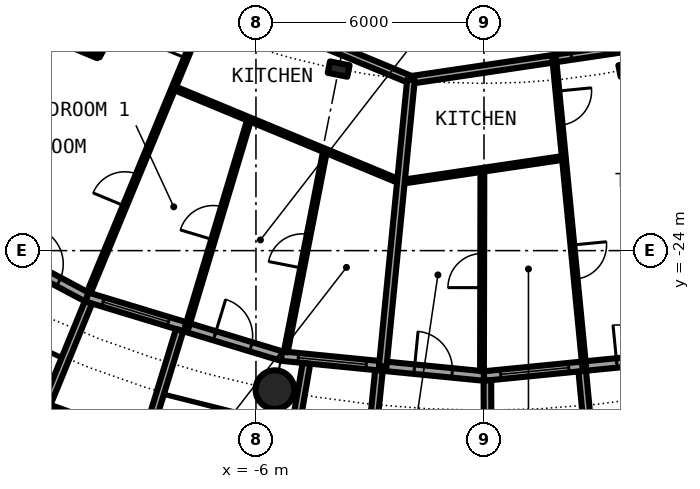
"""IFC4 building model, lengths in metres.
Left out: names, types, materials, properties, quantities, classifications, styles, units other than length and angle.
Written with IfcOpenShell. Run it as: python <this file> out.ifc"""

import sys

from ifc_helpers import new_model, si_unit, direction, frame, frame_2d, origin, origin_2d, place, context, subcontext, project, spatial, rectangle, circle, hollow_circle, i_section, extrude, element, fill, save


model = new_model("IFC4")
c1 = context("Model", 3, precision=1e-05, world=origin(), true_north=direction((0.0, 1.0)))
c2 = subcontext(c1, "Body", "Model", "MODEL_VIEW")
j1 = project(units=[si_unit("LENGTHUNIT", "METRE"), si_unit("PLANEANGLEUNIT", "RADIAN")], contexts=[c1])
p1 = place(None, origin())
s1 = spatial("IfcSite", under=j1, at=p1, CompositionType="ELEMENT")
p2 = place(p1, origin())
s2 = spatial("IfcBuilding", under=s1, at=p2, CompositionType="ELEMENT")
p3 = place(p2, frame((0.0, 0.0, 75.8)))
s3 = spatial("IfcBuildingStorey", under=s2, at=p3, CompositionType="ELEMENT", Elevation=75.8)
p4 = place(p3, frame((-5.501, -27.658, 0.0), z_axis=(0.0, 0.0, 1.0), x_axis=(1.0, 0.0, 0.0)))
e1 = element("IfcColumn", 1, at=p4, inside=s3, PredefinedType="COLUMN", context=c2, shape_type="SweptSolid", body=[
    extrude(hollow_circle(Radius=0.508, WallThickness=0.04, at=origin_2d()), origin(), (0.0, 0.0, 1.0), 3.05),
])
for number, where, z_axis, x_axis in (
    (2, (-3.824, -19.223, 0.0), (0.0, 0.0, 1.0), (-0.195, -0.981, 0.0)),
    (3, (3.824, -19.223, 0.0), (0.0, 0.0, 1.0), (0.195, -0.981, 0.0)),
):
    element("IfcColumn", number, at=place(p3, frame(where, z_axis=z_axis, x_axis=x_axis)), inside=s3, PredefinedType="COLUMN", context=c2, shape_type="SweptSolid", body=[
        extrude(i_section(OverallWidth=0.306, OverallDepth=0.524, WebThickness=0.021, FlangeThickness=0.04, FilletRadius=0.027, at=origin_2d()), origin(), (0.0, 0.0, 1.0), 3.05),
    ])
p5 = place(p3, frame((-15.167, -22.699, 0.0), z_axis=(0.0, 0.0, 1.0), x_axis=(0.881915646801, -0.471407246368, 0.0)))
e4 = element("IfcWall", 4, at=p5, inside=s3, PredefinedType="SOLIDWALL", context=c2, shape_type="SweptSolid", body=[
    extrude(rectangle(XDim=5.352, YDim=0.25, at=frame_2d((2.676, 0.0))), origin(), (0.0, 0.0, 1.0), 2.7),
])
p6 = place(p5, frame((0.441, 0.0, 0.3)))
e5 = element("IfcOpeningElement", 5, at=p6, cuts=e4, PredefinedType="OPENING", context=c2, shape_type="SweptSolid", body=[
    extrude(rectangle(XDim=1.8, YDim=2.1, at=frame_2d((0.9, 1.05))), frame((0.0, 0.135, 0.0), z_axis=(0.0, -1.0, 0.0), x_axis=(1.0, 0.0, 0.0)), (0.0, 0.0, 1.0), 0.27),
])
p7 = place(p5, frame((3.51, 0.0, 0.0)))
e6 = element("IfcOpeningElement", 6, at=p7, cuts=e4, PredefinedType="OPENING", context=c2, shape_type="SweptSolid", body=[
    extrude(rectangle(XDim=1.0, YDim=2.2, at=frame_2d((0.5, 1.1))), frame((0.0, 0.135, 0.0), z_axis=(0.0, -1.0, 0.0), x_axis=(1.0, 0.0, 0.0)), (0.0, 0.0, 1.0), 0.27),
])
p8 = place(p3, frame((-10.447, -25.222, 0.0), z_axis=(0.0, 0.0, 1.0), x_axis=(0.956965678721, -0.290201119486, 0.0)))
e7 = element("IfcWall", 7, at=p8, inside=s3, PredefinedType="SOLIDWALL", context=c2, shape_type="SweptSolid", body=[
    extrude(rectangle(XDim=5.351, YDim=0.25, at=frame_2d((2.676, 0.0))), origin(), (0.0, 0.0, 1.0), 2.7),
])
p9 = place(p8, frame((0.441, 0.0, 0.3)))
e8 = element("IfcOpeningElement", 8, at=p9, cuts=e7, PredefinedType="OPENING", context=c2, shape_type="SweptSolid", body=[
    extrude(rectangle(XDim=1.8, YDim=2.1, at=frame_2d((0.9, 1.05))), frame((0.0, 0.135, 0.0), z_axis=(0.0, -1.0, 0.0), x_axis=(1.0, 0.0, 0.0)), (0.0, 0.0, 1.0), 0.27),
])
p10 = place(p8, frame((3.51, 0.0, 0.0)))
e9 = element("IfcOpeningElement", 9, at=p10, cuts=e7, PredefinedType="OPENING", context=c2, shape_type="SweptSolid", body=[
    extrude(rectangle(XDim=1.0, YDim=2.2, at=frame_2d((0.5, 1.1))), frame((0.0, 0.135, 0.0), z_axis=(0.0, -1.0, 0.0), x_axis=(1.0, 0.0, 0.0)), (0.0, 0.0, 1.0), 0.27),
])
p11 = place(p3, frame((-11.638, -28.084, -0.03), z_axis=(0.0, 0.0, 1.0), x_axis=(0.941461077774, -0.337121697664, 0.0)))
e10 = element("IfcWall", 10, at=p11, inside=s3, PredefinedType="SOLIDWALL", context=c2, shape_type="SweptSolid", body=[
    extrude(rectangle(XDim=2.993, YDim=0.2, at=frame_2d((1.497, 0.0))), origin(), (0.0, 0.0, 1.0), 2.73),
])
p12 = place(p11, frame((0.457, 0.0, 0.33)))
e11 = element("IfcOpeningElement", 11, at=p12, cuts=e10, PredefinedType="OPENING", context=c2, shape_type="SweptSolid", body=[
    extrude(circle(Radius=1.04, at=frame_2d((1.04, 1.04))), frame((0.0, 0.11, 0.0), z_axis=(0.0, -1.0, 0.0), x_axis=(1.0, 0.0, 0.0)), (0.0, 0.0, 1.0), 0.22),
])
p13 = place(p3, frame((-10.409, -25.364, -0.03), z_axis=(0.0, 0.0, 1.0), x_axis=(-0.379509886562, -0.925187681501, 0.0)))
e12 = element("IfcWall", 12, at=p13, inside=s3, PredefinedType="SOLIDWALL", context=c2, shape_type="SweptSolid", body=[
    extrude(rectangle(XDim=2.883, YDim=0.2, at=frame_2d((1.441, 0.0))), origin(), (0.0, 0.0, 1.0), 2.73),
])
p14 = place(p3, frame((-8.009, -26.092, -0.03), z_axis=(0.0, 0.0, 1.0), x_axis=(-0.293406695073, -0.955987715029, 0.0)))
e13 = element("IfcWall", 13, at=p14, inside=s3, PredefinedType="SOLIDWALL", context=c2, shape_type="SweptSolid", body=[
    extrude(rectangle(XDim=3.006, YDim=0.2, at=frame_2d((1.503, 0.0))), origin(), (0.0, 0.0, 1.0), 2.73),
])
p15 = place(p3, frame((-5.326, -26.775, 0.0), z_axis=(0.0, 0.0, 1.0), x_axis=(0.995173996315, -0.098126026407, 0.0)))
e14 = element("IfcWall", 14, at=p15, inside=s3, PredefinedType="SOLIDWALL", context=c2, shape_type="SweptSolid", body=[
    extrude(rectangle(XDim=5.352, YDim=0.25, at=frame_2d((2.676, 0.0))), origin(), (0.0, 0.0, 1.0), 2.7),
])
p16 = place(p15, frame((0.441, 0.0, 0.3)))
e15 = element("IfcOpeningElement", 15, at=p16, cuts=e14, PredefinedType="OPENING", context=c2, shape_type="SweptSolid", body=[
    extrude(rectangle(XDim=1.8, YDim=2.1, at=frame_2d((0.9, 1.05))), frame((0.0, 0.135, 0.0), z_axis=(0.0, -1.0, 0.0), x_axis=(1.0, 0.0, 0.0)), (0.0, 0.0, 1.0), 0.27),
])
p17 = place(p15, frame((3.51, 0.0, 0.0)))
e16 = element("IfcOpeningElement", 16, at=p17, cuts=e14, PredefinedType="OPENING", context=c2, shape_type="SweptSolid", body=[
    extrude(rectangle(XDim=1.0, YDim=2.2, at=frame_2d((0.5, 1.1))), frame((0.0, 0.135, 0.0), z_axis=(0.0, -1.0, 0.0), x_axis=(1.0, 0.0, 0.0)), (0.0, 0.0, 1.0), 0.27),
])
p18 = place(p3, frame((-4.671, -26.966, -0.03), z_axis=(0.0, 0.0, 1.0), x_axis=(-0.170539878907, -0.985350774954, 0.0)))
e17 = element("IfcWall", 17, at=p18, inside=s3, PredefinedType="SOLIDWALL", context=c2, shape_type="SweptSolid", body=[
    extrude(rectangle(XDim=2.932, YDim=0.2, at=frame_2d((1.466, 0.0))), origin(), (0.0, 0.0, 1.0), 2.73),
])
p19 = place(p3, frame((-2.764, -27.153, -0.03), z_axis=(0.0, 0.0, 1.0), x_axis=(-0.101505487237, -0.994834979311, 0.0)))
e18 = element("IfcWall", 18, at=p19, inside=s3, PredefinedType="SOLIDWALL", context=c2, shape_type="SweptSolid", body=[
    extrude(rectangle(XDim=3.007, YDim=0.2, at=frame_2d((1.503, 0.0))), origin(), (0.0, 0.0, 1.0), 2.73),
])
p20 = place(p3, frame((0.0, -27.3, 0.0), z_axis=(0.0, 0.0, 1.0), x_axis=(0.995173996315, 0.098126026407, 0.0)))
e19 = element("IfcWall", 19, at=p20, inside=s3, PredefinedType="SOLIDWALL", context=c2, shape_type="SweptSolid", body=[
    extrude(rectangle(XDim=5.352, YDim=0.25, at=frame_2d((2.676, 0.0))), origin(), (0.0, 0.0, 1.0), 2.7),
])
p21 = place(p20, frame((0.441, 0.0, 0.3)))
e20 = element("IfcOpeningElement", 20, at=p21, cuts=e19, PredefinedType="OPENING", context=c2, shape_type="SweptSolid", body=[
    extrude(rectangle(XDim=1.8, YDim=2.1, at=frame_2d((0.9, 1.05))), frame((0.0, 0.135, 0.0), z_axis=(0.0, -1.0, 0.0), x_axis=(1.0, 0.0, 0.0)), (0.0, 0.0, 1.0), 0.27),
])
p22 = place(p20, frame((3.51, 0.0, 0.0)))
e21 = element("IfcOpeningElement", 21, at=p22, cuts=e19, PredefinedType="OPENING", context=c2, shape_type="SweptSolid", body=[
    extrude(rectangle(XDim=1.0, YDim=2.2, at=frame_2d((0.5, 1.1))), frame((0.0, 0.135, 0.0), z_axis=(0.0, -1.0, 0.0), x_axis=(1.0, 0.0, 0.0)), (0.0, 0.0, 1.0), 0.27),
])
p23 = place(p3, frame((0.09, -27.417, -0.03), z_axis=(0.0, 0.0, 1.0), x_axis=(0.00347308367, -0.999993968827, 0.0)))
e22 = element("IfcWall", 22, at=p23, inside=s3, PredefinedType="SOLIDWALL", context=c2, shape_type="SweptSolid", body=[
    extrude(rectangle(XDim=2.882, YDim=0.2, at=frame_2d((1.441, 0.0))), origin(), (0.0, 0.0, 1.0), 2.73),
])
p24 = place(p3, frame((2.586, -27.171, -0.03), z_axis=(0.0, 0.0, 1.0), x_axis=(0.094548432284, -0.995520262954, 0.0)))
e23 = element("IfcWall", 23, at=p24, inside=s3, PredefinedType="SOLIDWALL", context=c2, shape_type="SweptSolid", body=[
    extrude(rectangle(XDim=3.006, YDim=0.2, at=frame_2d((1.503, 0.0))), origin(), (0.0, 0.0, 1.0), 2.73),
])
p25 = place(p3, frame((-2.186, -22.193, 0.0), z_axis=(0.0, 0.0, 1.0), x_axis=(0.989171386505, 0.146765009863, 0.0)))
e24 = element("IfcWall", 24, at=p25, inside=s3, PredefinedType="PARTITIONING", context=c2, shape_type="SweptSolid", body=[
    extrude(rectangle(XDim=4.335, YDim=0.1, at=frame_2d((2.167, 0.0))), origin(), (0.0, 0.0, 1.0), 2.7),
])
p26 = place(p3, frame((-14.15, -17.236, 0.0), z_axis=(0.0, 0.0, 1.0), x_axis=(0.923789421174, -0.382900907975, 0.0)))
e25 = element("IfcWall", 25, at=p26, inside=s3, PredefinedType="PARTITIONING", context=c2, shape_type="SweptSolid", body=[
    extrude(rectangle(XDim=4.319, YDim=0.1, at=frame_2d((2.16, 0.0))), origin(), (0.0, 0.0, 1.0), 2.7),
])
p27 = place(p26, frame((0.634, 0.0, 0.0)))
e26 = element("IfcOpeningElement", 26, at=p27, cuts=e25, PredefinedType="OPENING", context=c2, shape_type="SweptSolid", body=[
    extrude(rectangle(XDim=0.9, YDim=2.3, at=frame_2d((0.45, 1.15))), frame((0.0, 0.06, 0.0), z_axis=(0.0, -1.0, 0.0), x_axis=(1.0, 0.0, 0.0)), (0.0, 0.0, 1.0), 0.12),
])
p28 = place(p3, frame((-8.168, -19.716, 0.0), z_axis=(0.0, 0.0, 1.0), x_axis=(0.923791567638, -0.382895729358, 0.0)))
e27 = element("IfcWall", 27, at=p28, inside=s3, PredefinedType="PARTITIONING", context=c2, shape_type="SweptSolid", body=[
    extrude(rectangle(XDim=6.474, YDim=0.1, at=frame_2d((3.237, 0.0))), origin(), (0.0, 0.0, 1.0), 2.7),
])
p29 = place(p3, frame((-1.918, -19.507, 0.0), z_axis=(0.0, 0.0, 1.0), x_axis=(0.989144916871, 0.146943300045, 0.0)))
e28 = element("IfcWall", 28, at=p29, inside=s3, PredefinedType="PARTITIONING", context=c2, shape_type="SweptSolid", body=[
    extrude(rectangle(XDim=9.529, YDim=0.2, at=frame_2d((4.764, 0.0))), origin(), (0.0, 0.0, 1.0), 2.38),
])
p30 = place(p29, frame((4.261, 0.0, 0.0)))
e29 = element("IfcOpeningElement", 29, at=p30, cuts=e28, PredefinedType="OPENING", context=c2, shape_type="SweptSolid", body=[
    extrude(rectangle(XDim=1.0, YDim=2.3, at=frame_2d((0.5, 1.15))), frame((0.0, 0.11, 0.0), z_axis=(0.0, -1.0, 0.0), x_axis=(1.0, 0.0, 0.0)), (0.0, 0.0, 1.0), 0.22),
])
p31 = place(p3, frame((-12.436, -15.15, 0.0), z_axis=(0.0, 0.0, 1.0), x_axis=(0.923858130651, -0.38273509694, 0.0)))
e30 = element("IfcWall", 30, at=p31, inside=s3, PredefinedType="PARTITIONING", context=c2, shape_type="SweptSolid", body=[
    extrude(rectangle(XDim=11.382, YDim=0.2, at=frame_2d((5.691, 0.0))), origin(), (0.0, 0.0, 1.0), 2.7),
])
p32 = place(p31, frame((4.239, 0.0, 0.0)))
e31 = element("IfcOpeningElement", 31, at=p32, cuts=e30, PredefinedType="OPENING", context=c2, shape_type="SweptSolid", body=[
    extrude(rectangle(XDim=1.0, YDim=2.3, at=frame_2d((0.5, 1.15))), frame((0.0, 0.11, 0.0), z_axis=(0.0, -1.0, 0.0), x_axis=(1.0, 0.0, 0.0)), (0.0, 0.0, 1.0), 0.22),
])
p33 = place(p3, frame((-10.399, -25.106, 0.0), z_axis=(0.0, 0.0, 1.0), x_axis=(0.382697543868, 0.923873687209, 0.0)))
e32 = element("IfcWall", 32, at=p33, inside=s3, PredefinedType="PARTITIONING", context=c2, shape_type="SweptSolid", body=[
    extrude(rectangle(XDim=8.419, YDim=0.1, at=frame_2d((4.209, 0.0))), origin(), (0.0, 0.0, 1.0), 2.7),
])
p34 = place(p33, frame((6.678, 0.0, 0.0)))
e33 = element("IfcOpeningElement", 33, at=p34, cuts=e32, PredefinedType="OPENING", context=c2, shape_type="SweptSolid", body=[
    extrude(rectangle(XDim=0.9, YDim=2.3, at=frame_2d((0.45, 1.15))), frame((0.0, 0.06, 0.0), z_axis=(0.0, -1.0, 0.0), x_axis=(1.0, 0.0, 0.0)), (0.0, 0.0, 1.0), 0.12),
])
p35 = place(p33, frame((2.468, 0.0, 0.0)))
e34 = element("IfcOpeningElement", 34, at=p35, cuts=e32, PredefinedType="OPENING", context=c2, shape_type="SweptSolid", body=[
    extrude(rectangle(XDim=0.9, YDim=2.3, at=frame_2d((0.45, 1.15))), frame((0.0, 0.06, 0.0), z_axis=(0.0, -1.0, 0.0), x_axis=(1.0, 0.0, 0.0)), (0.0, 0.0, 1.0), 0.12),
])
p36 = place(p3, frame((-10.16, -18.89, 0.0), z_axis=(0.0, 0.0, 1.0), x_axis=(0.4736792609, 0.880697426925, 0.0)))
e35 = element("IfcWall", 35, at=p36, inside=s3, PredefinedType="PARTITIONING", context=c2, shape_type="SweptSolid", body=[
    extrude(rectangle(XDim=2.597, YDim=0.1, at=frame_2d((1.298, 0.0))), origin(), (0.0, 0.0, 1.0), 2.7),
])
p37 = place(p36, frame((0.848, 0.0, 0.0)))
e36 = element("IfcOpeningElement", 36, at=p37, cuts=e35, PredefinedType="OPENING", context=c2, shape_type="SweptSolid", body=[
    extrude(rectangle(XDim=0.9, YDim=2.3, at=frame_2d((0.45, 1.15))), frame((0.0, 0.06, 0.0), z_axis=(0.0, -1.0, 0.0), x_axis=(1.0, 0.0, 0.0)), (0.0, 0.0, 1.0), 0.12),
])
p38 = place(p3, frame((-7.821, -26.025, 0.0), z_axis=(0.0, 0.0, 1.0), x_axis=(0.287793773423, 0.957692405723, 0.0)))
e37 = element("IfcWall", 37, at=p38, inside=s3, PredefinedType="PARTITIONING", context=c2, shape_type="SweptSolid", body=[
    extrude(rectangle(XDim=5.726, YDim=0.1, at=frame_2d((2.863, 0.0))), origin(), (0.0, 0.0, 1.0), 2.7),
])
p39 = place(p38, frame((2.413, 0.0, 0.0)))
e38 = element("IfcOpeningElement", 38, at=p39, cuts=e37, PredefinedType="OPENING", context=c2, shape_type="SweptSolid", body=[
    extrude(rectangle(XDim=0.9, YDim=2.3, at=frame_2d((0.45, 1.15))), frame((0.0, 0.06, 0.0), z_axis=(0.0, -1.0, 0.0), x_axis=(1.0, 0.0, 0.0)), (0.0, 0.0, 1.0), 0.12),
])
p40 = place(p3, frame((-5.217, -26.67, 0.0), z_axis=(0.0, 0.0, 1.0), x_axis=(0.192109041462, 0.981373586453, 0.0)))
e39 = element("IfcWall", 39, at=p40, inside=s3, PredefinedType="PARTITIONING", context=c2, shape_type="SweptSolid", body=[
    extrude(rectangle(XDim=5.404, YDim=0.1, at=frame_2d((2.702, 0.0))), origin(), (0.0, 0.0, 1.0), 2.7),
])
p41 = place(p40, frame((2.252, 0.0, 0.0)))
e40 = element("IfcOpeningElement", 40, at=p41, cuts=e39, PredefinedType="OPENING", context=c2, shape_type="SweptSolid", body=[
    extrude(rectangle(XDim=0.9, YDim=2.3, at=frame_2d((0.45, 1.15))), frame((0.0, 0.06, 0.0), z_axis=(0.0, -1.0, 0.0), x_axis=(1.0, 0.0, 0.0)), (0.0, 0.0, 1.0), 0.12),
])
p42 = place(p3, frame((-2.664, -27.044, 0.0), z_axis=(0.0, 0.0, 1.0), x_axis=(0.098115395479, 0.995175044487, 0.0)))
e41 = element("IfcWall", 41, at=p42, inside=s3, PredefinedType="PARTITIONING", context=c2, shape_type="SweptSolid", body=[
    extrude(rectangle(XDim=7.574, YDim=0.2, at=frame_2d((3.787, 0.0))), origin(), (0.0, 0.0, 1.0), 2.7),
])
p43 = place(p3, frame((-0.052, -27.175, 0.0), z_axis=(0.0, 0.0, 1.0), x_axis=(0.001888614256, 0.999998216567, 0.0)))
e42 = element("IfcWall", 42, at=p43, inside=s3, PredefinedType="PARTITIONING", context=c2, shape_type="SweptSolid", body=[
    extrude(rectangle(XDim=5.3, YDim=0.1, at=frame_2d((2.65, 0.0))), origin(), (0.0, 0.0, 1.0), 2.7),
])
p44 = place(p43, frame((2.2, 0.0, 0.0)))
e43 = element("IfcOpeningElement", 43, at=p44, cuts=e42, PredefinedType="OPENING", context=c2, shape_type="SweptSolid", body=[
    extrude(rectangle(XDim=0.9, YDim=2.3, at=frame_2d((0.45, 1.15))), frame((0.0, 0.06, 0.0), z_axis=(0.0, -1.0, 0.0), x_axis=(1.0, 0.0, 0.0)), (0.0, 0.0, 1.0), 0.12),
])
p45 = place(p3, frame((1.848, -18.947, 0.0), z_axis=(0.0, 0.0, 1.0), x_axis=(0.09695500902, -0.995288765246, 0.0)))
e44 = element("IfcWall", 44, at=p45, inside=s3, PredefinedType="PARTITIONING", context=c2, shape_type="SweptSolid", body=[
    extrude(rectangle(XDim=8.138, YDim=0.1, at=frame_2d((4.069, 0.0))), origin(), (0.0, 0.0, 1.0), 2.7),
])
p46 = place(p45, frame((0.861, 0.0, 0.0)))
e45 = element("IfcOpeningElement", 45, at=p46, cuts=e44, PredefinedType="OPENING", context=c2, shape_type="SweptSolid", body=[
    extrude(rectangle(XDim=0.9, YDim=2.3, at=frame_2d((0.45, 1.15))), frame((0.0, 0.06, 0.0), z_axis=(0.0, -1.0, 0.0), x_axis=(1.0, 0.0, 0.0)), (0.0, 0.0, 1.0), 0.12),
])
p47 = place(p45, frame((4.93, 0.0, 0.0)))
e46 = element("IfcOpeningElement", 46, at=p47, cuts=e44, PredefinedType="OPENING", context=c2, shape_type="SweptSolid", body=[
    extrude(rectangle(XDim=0.9, YDim=2.3, at=frame_2d((0.45, 1.15))), frame((0.0, 0.06, 0.0), z_axis=(0.0, -1.0, 0.0), x_axis=(1.0, 0.0, 0.0)), (0.0, 0.0, 1.0), 0.12),
])
p48 = place(p7, origin())
e47 = element("IfcDoor", 47, at=p48, inside=s3, OperationType="SINGLE_SWING_LEFT", PredefinedType="DOOR", context=c2, shape_type="SweptSolid", body=[
    extrude(rectangle(XDim=1.0, YDim=2.2, at=frame_2d((0.5, 1.1))), frame((0.0, 0.025, 0.0), z_axis=(0.0, -1.0, 0.0), x_axis=(1.0, 0.0, 0.0)), (0.0, 0.0, 1.0), 0.05),
])
fill(e6, e47)
p49 = place(p9, origin())
e48 = element("IfcWindow", 48, at=p49, inside=s3, PartitioningType="SINGLE_PANEL", PredefinedType="WINDOW", context=c2, shape_type="SweptSolid", body=[
    extrude(rectangle(XDim=1.8, YDim=2.1, at=frame_2d((0.9, 1.05))), frame((0.0, 0.03, 0.0), z_axis=(0.0, -1.0, 0.0), x_axis=(1.0, 0.0, 0.0)), (0.0, 0.0, 1.0), 0.06),
])
fill(e8, e48)
p50 = place(p10, origin())
e49 = element("IfcDoor", 49, at=p50, inside=s3, OperationType="SINGLE_SWING_LEFT", PredefinedType="DOOR", context=c2, shape_type="SweptSolid", body=[
    extrude(rectangle(XDim=1.0, YDim=2.2, at=frame_2d((0.5, 1.1))), frame((0.0, 0.025, 0.0), z_axis=(0.0, -1.0, 0.0), x_axis=(1.0, 0.0, 0.0)), (0.0, 0.0, 1.0), 0.05),
])
fill(e9, e49)
p51 = place(p16, origin())
e50 = element("IfcWindow", 50, at=p51, inside=s3, PartitioningType="SINGLE_PANEL", PredefinedType="WINDOW", context=c2, shape_type="SweptSolid", body=[
    extrude(rectangle(XDim=1.8, YDim=2.1, at=frame_2d((0.9, 1.05))), frame((0.0, 0.03, 0.0), z_axis=(0.0, -1.0, 0.0), x_axis=(1.0, 0.0, 0.0)), (0.0, 0.0, 1.0), 0.06),
])
fill(e15, e50)
p52 = place(p17, origin())
e51 = element("IfcDoor", 51, at=p52, inside=s3, OperationType="SINGLE_SWING_LEFT", PredefinedType="DOOR", context=c2, shape_type="SweptSolid", body=[
    extrude(rectangle(XDim=1.0, YDim=2.2, at=frame_2d((0.5, 1.1))), frame((0.0, 0.025, 0.0), z_axis=(0.0, -1.0, 0.0), x_axis=(1.0, 0.0, 0.0)), (0.0, 0.0, 1.0), 0.05),
])
fill(e16, e51)
p53 = place(p21, origin())
e52 = element("IfcWindow", 52, at=p53, inside=s3, PartitioningType="SINGLE_PANEL", PredefinedType="WINDOW", context=c2, shape_type="SweptSolid", body=[
    extrude(rectangle(XDim=1.8, YDim=2.1, at=frame_2d((0.9, 1.05))), frame((0.0, 0.03, 0.0), z_axis=(0.0, -1.0, 0.0), x_axis=(1.0, 0.0, 0.0)), (0.0, 0.0, 1.0), 0.06),
])
fill(e20, e52)
p54 = place(p22, origin())
e53 = element("IfcDoor", 53, at=p54, inside=s3, OperationType="SINGLE_SWING_LEFT", PredefinedType="DOOR", context=c2, shape_type="SweptSolid", body=[
    extrude(rectangle(XDim=1.0, YDim=2.2, at=frame_2d((0.5, 1.1))), frame((0.0, 0.025, 0.0), z_axis=(0.0, -1.0, 0.0), x_axis=(1.0, 0.0, 0.0)), (0.0, 0.0, 1.0), 0.05),
])
fill(e21, e53)
p55 = place(p34, origin())
e54 = element("IfcDoor", 54, at=p55, inside=s3, OperationType="SINGLE_SWING_RIGHT", PredefinedType="DOOR", context=c2, shape_type="SweptSolid", body=[
    extrude(rectangle(XDim=0.9, YDim=2.3, at=frame_2d((0.45, 1.15))), frame((0.0, 0.025, 0.0), z_axis=(0.0, -1.0, 0.0), x_axis=(1.0, 0.0, 0.0)), (0.0, 0.0, 1.0), 0.05),
])
fill(e33, e54)
p56 = place(p35, origin())
e55 = element("IfcDoor", 55, at=p56, inside=s3, OperationType="SINGLE_SWING_LEFT", PredefinedType="DOOR", context=c2, shape_type="SweptSolid", body=[
    extrude(rectangle(XDim=0.9, YDim=2.3, at=frame_2d((0.45, 1.15))), frame((0.0, 0.025, 0.0), z_axis=(0.0, -1.0, 0.0), x_axis=(1.0, 0.0, 0.0)), (0.0, 0.0, 1.0), 0.05),
])
fill(e34, e55)
p57 = place(p39, origin())
e56 = element("IfcDoor", 56, at=p57, inside=s3, OperationType="SINGLE_SWING_LEFT", PredefinedType="DOOR", context=c2, shape_type="SweptSolid", body=[
    extrude(rectangle(XDim=0.9, YDim=2.3, at=frame_2d((0.45, 1.15))), frame((0.0, 0.025, 0.0), z_axis=(0.0, -1.0, 0.0), x_axis=(1.0, 0.0, 0.0)), (0.0, 0.0, 1.0), 0.05),
])
fill(e38, e56)
p58 = place(p41, origin())
e57 = element("IfcDoor", 57, at=p58, inside=s3, OperationType="SINGLE_SWING_RIGHT", PredefinedType="DOOR", context=c2, shape_type="SweptSolid", body=[
    extrude(rectangle(XDim=0.9, YDim=2.3, at=frame_2d((0.45, 1.15))), frame((0.0, 0.025, 0.0), z_axis=(0.0, -1.0, 0.0), x_axis=(1.0, 0.0, 0.0)), (0.0, 0.0, 1.0), 0.05),
])
fill(e40, e57)
p59 = place(p30, origin())
e58 = element("IfcDoor", 58, at=p59, inside=s3, OperationType="SINGLE_SWING_LEFT", PredefinedType="DOOR", context=c2, shape_type="SweptSolid", body=[
    extrude(rectangle(XDim=1.0, YDim=2.3, at=frame_2d((0.5, 1.15))), frame((0.0, 0.025, 0.0), z_axis=(0.0, -1.0, 0.0), x_axis=(1.0, 0.0, 0.0)), (0.0, 0.0, 1.0), 0.05),
])
fill(e29, e58)
p60 = place(p46, origin())
e59 = element("IfcDoor", 59, at=p60, inside=s3, OperationType="SINGLE_SWING_LEFT", PredefinedType="DOOR", context=c2, shape_type="SweptSolid", body=[
    extrude(rectangle(XDim=0.9, YDim=2.3, at=frame_2d((0.45, 1.15))), frame((0.0, 0.025, 0.0), z_axis=(0.0, -1.0, 0.0), x_axis=(1.0, 0.0, 0.0)), (0.0, 0.0, 1.0), 0.05),
])
fill(e45, e59)
p61 = place(p47, origin())
e60 = element("IfcDoor", 60, at=p61, inside=s3, OperationType="SINGLE_SWING_RIGHT", PredefinedType="DOOR", context=c2, shape_type="SweptSolid", body=[
    extrude(rectangle(XDim=0.9, YDim=2.3, at=frame_2d((0.45, 1.15))), frame((0.0, 0.025, 0.0), z_axis=(0.0, -1.0, 0.0), x_axis=(1.0, 0.0, 0.0)), (0.0, 0.0, 1.0), 0.05),
])
fill(e46, e60)
p62 = place(p44, origin())
e61 = element("IfcDoor", 61, at=p62, inside=s3, OperationType="SINGLE_SWING_RIGHT", PredefinedType="DOOR", context=c2, shape_type="SweptSolid", body=[
    extrude(rectangle(XDim=0.9, YDim=2.3, at=frame_2d((0.45, 1.15))), frame((0.0, 0.025, 0.0), z_axis=(0.0, -1.0, 0.0), x_axis=(1.0, 0.0, 0.0)), (0.0, 0.0, 1.0), 0.05),
])
fill(e43, e61)
save(model, sys.argv[1])
